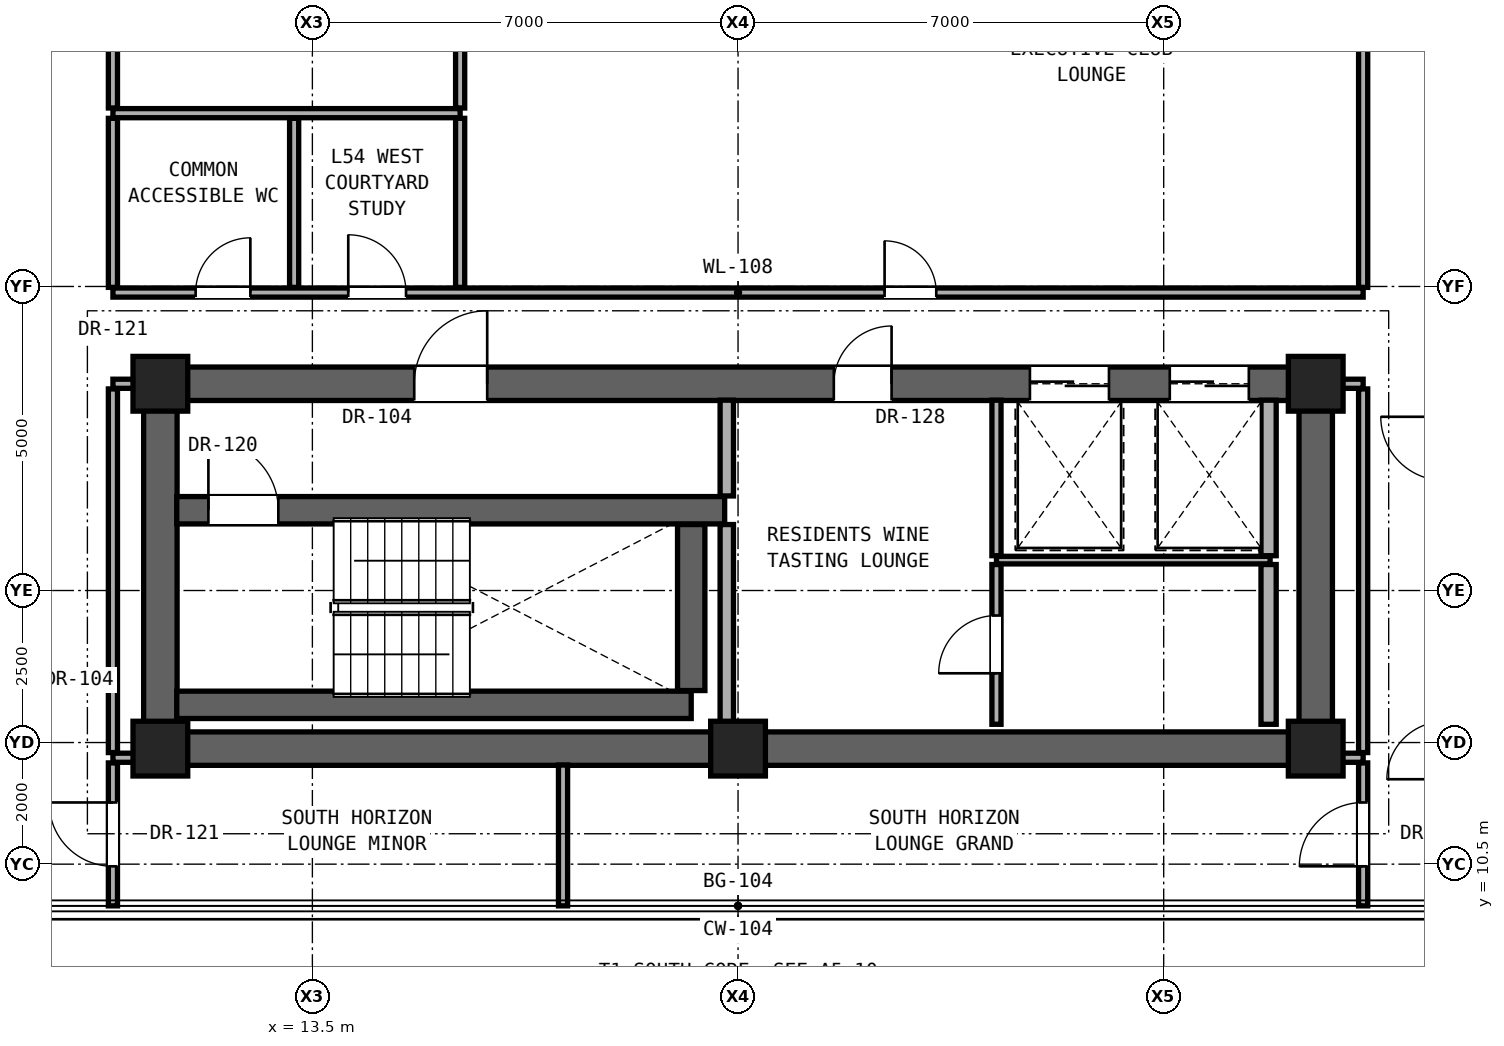
"""IFC4 building model, lengths in metres.
Left out: names, types, materials, properties, quantities, classifications, styles, units other than length and angle.
Written with IfcOpenShell. Run it as: python <this file> out.ifc"""

import sys

from ifc_helpers import new_model, si_unit, direction, frame, frame_2d, origin, origin_2d, place, context, subcontext, project, spatial, rectangle, extrude, element, fill, save


model = new_model("IFC4")
c1 = context("Model", 3, precision=1e-05, world=origin(), true_north=direction((0.0, 1.0)))
c2 = subcontext(c1, "Body", "Model", "MODEL_VIEW")
j1 = project(units=[si_unit("LENGTHUNIT", "METRE"), si_unit("PLANEANGLEUNIT", "RADIAN")], contexts=[c1])
p1 = place(None, origin())
s1 = spatial("IfcSite", under=j1, at=p1, CompositionType="ELEMENT")
p2 = place(p1, origin())
s2 = spatial("IfcBuilding", under=s1, at=p2, CompositionType="ELEMENT")
p3 = place(p2, frame((0.0, 0.0, 190.15)))
s3 = spatial("IfcBuildingStorey", under=s2, at=p3, CompositionType="ELEMENT", Elevation=190.15)
for number, where, z_axis, x_axis in (
    (1, (11.0, 12.4, 0.0), (0.0, 0.0, 1.0), (1.0, 0.0, 0.0)),
    (2, (20.5, 12.4, 0.0), (0.0, 0.0, 1.0), (1.0, 0.0, 0.0)),
    (3, (30.0, 12.4, 0.0), (0.0, 0.0, 1.0), (1.0, 0.0, 0.0)),
    (4, (11.0, 18.4, 0.0), (0.0, 0.0, 1.0), (1.0, 0.0, 0.0)),
    (5, (30.0, 18.4, 0.0), (0.0, 0.0, 1.0), (1.0, 0.0, 0.0)),
):
    element("IfcColumn", number, at=place(p3, frame(where, z_axis=z_axis, x_axis=x_axis)), inside=s3, PredefinedType="COLUMN", context=c2, shape_type="SweptSolid", body=[
        extrude(rectangle(XDim=0.9, YDim=0.9, at=origin_2d()), origin(), (0.0, 0.0, 1.0), 3.25),
    ])
p4 = place(p3, frame((11.0, 12.4, 0.0), z_axis=(0.0, 0.0, 1.0), x_axis=(1.0, 0.0, 0.0)))
e6 = element("IfcWall", 6, at=p4, inside=s3, PredefinedType="SHEAR", context=c2, shape_type="SweptSolid", body=[
    extrude(rectangle(XDim=19.0, YDim=0.55, at=frame_2d((9.5, 0.0))), origin(), (0.0, 0.0, 1.0), 3.05),
])
for number, where, z_axis, x_axis in (
    (7, (11.0, 12.4, 0.0), (0.0, 0.0, 1.0), (0.0, 1.0, 0.0)),
    (8, (30.0, 12.4, 0.0), (0.0, 0.0, 1.0), (0.0, 1.0, 0.0)),
):
    element("IfcWall", number, at=place(p3, frame(where, z_axis=z_axis, x_axis=x_axis)), inside=s3, PredefinedType="SHEAR", context=c2, shape_type="SweptSolid", body=[
        extrude(rectangle(XDim=6.0, YDim=0.55, at=frame_2d((3.0, 0.0))), origin(), (0.0, 0.0, 1.0), 3.05),
    ])
p5 = place(p3, frame((11.0, 18.4, 0.0), z_axis=(0.0, 0.0, 1.0), x_axis=(1.0, 0.0, 0.0)))
e9 = element("IfcWall", 9, at=p5, inside=s3, PredefinedType="SHEAR", context=c2, shape_type="SweptSolid", body=[
    extrude(rectangle(XDim=19.0, YDim=0.55, at=frame_2d((9.5, 0.0))), origin(), (0.0, 0.0, 1.0), 3.05),
])
p6 = place(p5, frame((4.175, 0.0, 0.0)))
e10 = element("IfcOpeningElement", 10, at=p6, cuts=e9, PredefinedType="OPENING", context=c2, shape_type="SweptSolid", body=[
    extrude(rectangle(XDim=1.2, YDim=2.25, at=frame_2d((0.6, 1.125))), frame((0.0, 0.285, 0.0), z_axis=(0.0, -1.0, 0.0), x_axis=(1.0, 0.0, 0.0)), (0.0, 0.0, 1.0), 0.57),
])
p7 = place(p5, frame((11.075, 0.0, 0.0)))
e11 = element("IfcOpeningElement", 11, at=p7, cuts=e9, PredefinedType="OPENING", context=c2, shape_type="SweptSolid", body=[
    extrude(rectangle(XDim=0.95, YDim=2.15, at=frame_2d((0.475, 1.075))), frame((0.0, 0.285, 0.0), z_axis=(0.0, -1.0, 0.0), x_axis=(1.0, 0.0, 0.0)), (0.0, 0.0, 1.0), 0.57),
])
p8 = place(p5, frame((14.3, 0.0, 0.0)))
e12 = element("IfcOpeningElement", 12, at=p8, cuts=e9, PredefinedType="OPENING", context=c2, shape_type="SweptSolid", body=[
    extrude(rectangle(XDim=1.3, YDim=2.3, at=frame_2d((0.65, 1.15))), frame((0.0, 0.285, 0.0), z_axis=(0.0, -1.0, 0.0), x_axis=(1.0, 0.0, 0.0)), (0.0, 0.0, 1.0), 0.57),
])
p9 = place(p5, frame((16.6, 0.0, 0.0)))
e13 = element("IfcOpeningElement", 13, at=p9, cuts=e9, PredefinedType="OPENING", context=c2, shape_type="SweptSolid", body=[
    extrude(rectangle(XDim=1.3, YDim=2.3, at=frame_2d((0.65, 1.15))), frame((0.0, 0.285, 0.0), z_axis=(0.0, -1.0, 0.0), x_axis=(1.0, 0.0, 0.0)), (0.0, 0.0, 1.0), 0.57),
])
for number, where, z_axis, x_axis in (
    (14, (10.22, 12.25, 0.0), (0.0, 0.0, 1.0), (1.0, 0.0, 0.0)),
    (15, (30.27, 12.25, 0.0), (0.0, 0.0, 1.0), (1.0, 0.0, 0.0)),
):
    element("IfcWall", number, at=place(p3, frame(where, z_axis=z_axis, x_axis=x_axis)), inside=s3, PredefinedType="PARTITIONING", context=c2, shape_type="SweptSolid", body=[
        extrude(rectangle(XDim=0.51, YDim=0.15, at=frame_2d((0.255, 0.0))), origin(), (0.0, 0.0, 1.0), 3.05),
    ])
p10 = place(p3, frame((11.27, 13.12, 0.0), z_axis=(0.0, 0.0, 1.0), x_axis=(1.0, 0.0, 0.0)))
e16 = element("IfcWall", 16, at=p10, inside=s3, PredefinedType="SHEAR", context=c2, shape_type="SweptSolid", body=[
    extrude(rectangle(XDim=8.46, YDim=0.45, at=frame_2d((4.23, 0.0))), origin(), (0.0, 0.0, 1.0), 3.05),
])
p11 = place(p3, frame((24.75, 15.5, 0.0), z_axis=(0.0, 0.0, 1.0), x_axis=(1.0, 0.0, 0.0)))
e17 = element("IfcWall", 17, at=p11, inside=s3, PredefinedType="PARTITIONING", context=c2, shape_type="SweptSolid", body=[
    extrude(rectangle(XDim=4.5, YDim=0.125, at=frame_2d((2.25, 0.0))), origin(), (0.0, 0.0, 1.0), 3.05),
])
p12 = place(p3, frame((11.27, 16.32, 0.0), z_axis=(0.0, 0.0, 1.0), x_axis=(1.0, 0.0, 0.0)))
e18 = element("IfcWall", 18, at=p12, inside=s3, PredefinedType="SHEAR", context=c2, shape_type="SweptSolid", body=[
    extrude(rectangle(XDim=9.01, YDim=0.45, at=frame_2d((4.505, 0.0))), origin(), (0.0, 0.0, 1.0), 3.05),
])
p13 = place(p12, frame((0.52, 0.0, 0.0)))
e19 = element("IfcOpeningElement", 19, at=p13, cuts=e18, PredefinedType="OPENING", context=c2, shape_type="SweptSolid", body=[
    extrude(rectangle(XDim=1.15, YDim=2.2, at=frame_2d((0.575, 1.1))), frame((0.0, 0.235, 0.0), z_axis=(0.0, -1.0, 0.0), x_axis=(1.0, 0.0, 0.0)), (0.0, 0.0, 1.0), 0.47),
])
for number, where, z_axis, x_axis in (
    (20, (10.22, 18.4, 0.0), (0.0, 0.0, 1.0), (1.0, 0.0, 0.0)),
    (21, (30.27, 18.4, 0.0), (0.0, 0.0, 1.0), (1.0, 0.0, 0.0)),
):
    element("IfcWall", number, at=place(p3, frame(where, z_axis=z_axis, x_axis=x_axis)), inside=s3, PredefinedType="PARTITIONING", context=c2, shape_type="SweptSolid", body=[
        extrude(rectangle(XDim=0.51, YDim=0.15, at=frame_2d((0.255, 0.0))), origin(), (0.0, 0.0, 1.0), 2.442),
    ])
p14 = place(p3, frame((10.22, 19.9, 0.0), z_axis=(0.0, 0.0, 1.0), x_axis=(1.0, 0.0, 0.0)))
e22 = element("IfcWall", 22, at=p14, inside=s3, PredefinedType="PARTITIONING", context=c2, shape_type="SweptSolid", body=[
    extrude(rectangle(XDim=20.56, YDim=0.15, at=frame_2d((10.28, 0.0))), origin(), (0.0, 0.0, 1.0), 2.186),
])
p15 = place(p14, frame((1.36, 0.0, 0.0)))
e23 = element("IfcOpeningElement", 23, at=p15, cuts=e22, PredefinedType="OPENING", context=c2, shape_type="SweptSolid", body=[
    extrude(rectangle(XDim=0.9, YDim=2.1, at=frame_2d((0.45, 1.05))), frame((0.0, 0.085, 0.0), z_axis=(0.0, -1.0, 0.0), x_axis=(1.0, 0.0, 0.0)), (0.0, 0.0, 1.0), 0.17),
])
p16 = place(p14, frame((3.87, 0.0, 0.0)))
e24 = element("IfcOpeningElement", 24, at=p16, cuts=e22, PredefinedType="OPENING", context=c2, shape_type="SweptSolid", body=[
    extrude(rectangle(XDim=0.95, YDim=2.15, at=frame_2d((0.475, 1.075))), frame((0.0, 0.085, 0.0), z_axis=(0.0, -1.0, 0.0), x_axis=(1.0, 0.0, 0.0)), (0.0, 0.0, 1.0), 0.17),
])
p17 = place(p14, frame((12.69, 0.0, 0.0)))
e25 = element("IfcOpeningElement", 25, at=p17, cuts=e22, PredefinedType="OPENING", context=c2, shape_type="SweptSolid", body=[
    extrude(rectangle(XDim=0.85, YDim=2.01, at=frame_2d((0.425, 1.005))), frame((0.0, 0.085, 0.0), z_axis=(0.0, -1.0, 0.0), x_axis=(1.0, 0.0, 0.0)), (0.0, 0.0, 1.0), 0.17),
])
p18 = place(p3, frame((10.22, 22.85, 0.0), z_axis=(0.0, 0.0, 1.0), x_axis=(1.0, 0.0, 0.0)))
e26 = element("IfcWall", 26, at=p18, inside=s3, PredefinedType="PARTITIONING", context=c2, shape_type="SweptSolid", body=[
    extrude(rectangle(XDim=5.71, YDim=0.15, at=frame_2d((2.855, 0.0))), origin(), (0.0, 0.0, 1.0), 2.186),
])
p19 = place(p3, frame((10.22, 9.814, 0.0), z_axis=(0.0, 0.0, 1.0), x_axis=(0.0, 1.0, 0.0)))
e27 = element("IfcWall", 27, at=p19, inside=s3, PredefinedType="PARTITIONING", context=c2, shape_type="SweptSolid", body=[
    extrude(rectangle(XDim=2.351, YDim=0.15, at=frame_2d((1.176, 0.0))), origin(), (0.0, 0.0, 1.0), 3.05),
])
p20 = place(p19, frame((0.65, 0.0, 0.0)))
e28 = element("IfcOpeningElement", 28, at=p20, cuts=e27, PredefinedType="OPENING", context=c2, shape_type="SweptSolid", body=[
    extrude(rectangle(XDim=1.05, YDim=2.2, at=frame_2d((0.525, 1.1))), frame((0.0, 0.085, 0.0), z_axis=(0.0, -1.0, 0.0), x_axis=(1.0, 0.0, 0.0)), (0.0, 0.0, 1.0), 0.17),
])
p21 = place(p3, frame((10.22, 12.335, 0.0), z_axis=(0.0, 0.0, 1.0), x_axis=(0.0, 1.0, 0.0)))
e29 = element("IfcWall", 29, at=p21, inside=s3, PredefinedType="PARTITIONING", context=c2, shape_type="SweptSolid", body=[
    extrude(rectangle(XDim=5.98, YDim=0.15, at=frame_2d((2.99, 0.0))), origin(), (0.0, 0.0, 1.0), 2.442),
])
p22 = place(p3, frame((10.22, 19.985, 0.0), z_axis=(0.0, 0.0, 1.0), x_axis=(0.0, 1.0, 0.0)))
e30 = element("IfcWall", 30, at=p22, inside=s3, PredefinedType="PARTITIONING", context=c2, shape_type="SweptSolid", body=[
    extrude(rectangle(XDim=2.78, YDim=0.15, at=frame_2d((1.39, 0.0))), origin(), (0.0, 0.0, 1.0), 3.05),
])
p23 = place(p3, frame((10.22, 22.935, 0.0), z_axis=(0.0, 0.0, 1.0), x_axis=(0.0, 1.0, 0.0)))
e31 = element("IfcWall", 31, at=p23, inside=s3, PredefinedType="PARTITIONING", context=c2, shape_type="SweptSolid", body=[
    extrude(rectangle(XDim=10.08, YDim=0.15, at=frame_2d((5.04, 0.0))), origin(), (0.0, 0.0, 1.0), 2.346),
])
p24 = place(p23, frame((4.565, 0.0, 0.0)))
e32 = element("IfcOpeningElement", 32, at=p24, cuts=e31, PredefinedType="OPENING", context=c2, shape_type="SweptSolid", body=[
    extrude(rectangle(XDim=0.95, YDim=2.15, at=frame_2d((0.475, 1.075))), frame((0.0, 0.085, 0.0), z_axis=(0.0, -1.0, 0.0), x_axis=(1.0, 0.0, 0.0)), (0.0, 0.0, 1.0), 0.17),
])
for number, where, z_axis, x_axis in (
    (33, (13.2, 19.985, 0.0), (0.0, 0.0, 1.0), (0.0, 1.0, 0.0)),
    (34, (15.93, 19.985, 0.0), (0.0, 0.0, 1.0), (0.0, 1.0, 0.0)),
):
    element("IfcWall", number, at=place(p3, frame(where, z_axis=z_axis, x_axis=x_axis)), inside=s3, PredefinedType="PARTITIONING", context=c2, shape_type="SweptSolid", body=[
        extrude(rectangle(XDim=2.78, YDim=0.15, at=frame_2d((1.39, 0.0))), origin(), (0.0, 0.0, 1.0), 3.05),
    ])
p25 = place(p3, frame((15.93, 22.935, 0.0), z_axis=(0.0, 0.0, 1.0), x_axis=(0.0, 1.0, 0.0)))
e35 = element("IfcWall", 35, at=p25, inside=s3, PredefinedType="PARTITIONING", context=c2, shape_type="SweptSolid", body=[
    extrude(rectangle(XDim=4.536, YDim=0.15, at=frame_2d((2.268, 0.0))), origin(), (0.0, 0.0, 1.0), 2.186),
])
p26 = place(p3, frame((17.622, 9.814, 0.0), z_axis=(0.0, 0.0, 1.0), x_axis=(0.0, 1.0, 0.0)))
e36 = element("IfcWall", 36, at=p26, inside=s3, PredefinedType="PARTITIONING", context=c2, shape_type="SweptSolid", body=[
    extrude(rectangle(XDim=2.316, YDim=0.15, at=frame_2d((1.158, 0.0))), origin(), (0.0, 0.0, 1.0), 3.05),
])
p27 = place(p3, frame((19.73, 13.355, 0.0), z_axis=(0.0, 0.0, 1.0), x_axis=(0.0, 1.0, 0.0)))
e37 = element("IfcWall", 37, at=p27, inside=s3, PredefinedType="SHEAR", context=c2, shape_type="SweptSolid", body=[
    extrude(rectangle(XDim=2.73, YDim=0.45, at=frame_2d((1.365, 0.0))), origin(), (0.0, 0.0, 1.0), 3.05),
])
p28 = place(p3, frame((20.315, 12.8, 0.0), z_axis=(0.0, 0.0, 1.0), x_axis=(0.0, 1.0, 0.0)))
e38 = element("IfcWall", 38, at=p28, inside=s3, PredefinedType="SOLIDWALL", context=c2, shape_type="SweptSolid", body=[
    extrude(rectangle(XDim=3.285, YDim=0.22, at=frame_2d((1.643, 0.0))), origin(), (0.0, 0.0, 1.0), 3.05),
])
p29 = place(p3, frame((20.315, 16.555, 0.0), z_axis=(0.0, 0.0, 1.0), x_axis=(0.0, 1.0, 0.0)))
e39 = element("IfcWall", 39, at=p29, inside=s3, PredefinedType="SOLIDWALL", context=c2, shape_type="SweptSolid", body=[
    extrude(rectangle(XDim=1.575, YDim=0.22, at=frame_2d((0.788, 0.0))), origin(), (0.0, 0.0, 1.0), 3.05),
])
p30 = place(p3, frame((24.75, 12.8, 0.0), z_axis=(0.0, 0.0, 1.0), x_axis=(0.0, 1.0, 0.0)))
e40 = element("IfcWall", 40, at=p30, inside=s3, PredefinedType="PARTITIONING", context=c2, shape_type="SweptSolid", body=[
    extrude(rectangle(XDim=2.627, YDim=0.15, at=frame_2d((1.314, 0.0))), origin(), (0.0, 0.0, 1.0), 3.05),
])
p31 = place(p30, frame((0.839, 0.0, 0.0)))
e41 = element("IfcOpeningElement", 41, at=p31, cuts=e40, PredefinedType="OPENING", context=c2, shape_type="SweptSolid", body=[
    extrude(rectangle(XDim=0.95, YDim=2.15, at=frame_2d((0.475, 1.075))), frame((0.0, 0.085, 0.0), z_axis=(0.0, -1.0, 0.0), x_axis=(1.0, 0.0, 0.0)), (0.0, 0.0, 1.0), 0.17),
])
p32 = place(p3, frame((24.75, 15.573, 0.0), z_axis=(0.0, 0.0, 1.0), x_axis=(0.0, 1.0, 0.0)))
e42 = element("IfcWall", 42, at=p32, inside=s3, PredefinedType="PARTITIONING", context=c2, shape_type="SweptSolid", body=[
    extrude(rectangle(XDim=2.557, YDim=0.15, at=frame_2d((1.279, 0.0))), origin(), (0.0, 0.0, 1.0), 3.05),
])
p33 = place(p3, frame((29.225, 12.8, 0.0), z_axis=(0.0, 0.0, 1.0), x_axis=(0.0, 1.0, 0.0)))
e43 = element("IfcWall", 43, at=p33, inside=s3, PredefinedType="SOLIDWALL", context=c2, shape_type="SweptSolid", body=[
    extrude(rectangle(XDim=2.627, YDim=0.25, at=frame_2d((1.314, 0.0))), origin(), (0.0, 0.0, 1.0), 3.05),
])
p34 = place(p3, frame((29.225, 15.573, 0.0), z_axis=(0.0, 0.0, 1.0), x_axis=(0.0, 1.0, 0.0)))
e44 = element("IfcWall", 44, at=p34, inside=s3, PredefinedType="SOLIDWALL", context=c2, shape_type="SweptSolid", body=[
    extrude(rectangle(XDim=2.557, YDim=0.25, at=frame_2d((1.279, 0.0))), origin(), (0.0, 0.0, 1.0), 3.05),
])
p35 = place(p3, frame((30.78, 9.814, 0.0), z_axis=(0.0, 0.0, 1.0), x_axis=(0.0, 1.0, 0.0)))
e45 = element("IfcWall", 45, at=p35, inside=s3, PredefinedType="PARTITIONING", context=c2, shape_type="SweptSolid", body=[
    extrude(rectangle(XDim=2.351, YDim=0.15, at=frame_2d((1.176, 0.0))), origin(), (0.0, 0.0, 1.0), 3.05),
])
p36 = place(p35, frame((0.65, 0.0, 0.0)))
e46 = element("IfcOpeningElement", 46, at=p36, cuts=e45, PredefinedType="OPENING", context=c2, shape_type="SweptSolid", body=[
    extrude(rectangle(XDim=1.05, YDim=2.2, at=frame_2d((0.525, 1.1))), frame((0.0, 0.085, 0.0), z_axis=(0.0, -1.0, 0.0), x_axis=(1.0, 0.0, 0.0)), (0.0, 0.0, 1.0), 0.17),
])
p37 = place(p3, frame((30.78, 12.335, 0.0), z_axis=(0.0, 0.0, 1.0), x_axis=(0.0, 1.0, 0.0)))
e47 = element("IfcWall", 47, at=p37, inside=s3, PredefinedType="PARTITIONING", context=c2, shape_type="SweptSolid", body=[
    extrude(rectangle(XDim=5.98, YDim=0.15, at=frame_2d((2.99, 0.0))), origin(), (0.0, 0.0, 1.0), 2.442),
])
p38 = place(p3, frame((30.78, 19.985, 0.0), z_axis=(0.0, 0.0, 1.0), x_axis=(0.0, 1.0, 0.0)))
e48 = element("IfcWall", 48, at=p38, inside=s3, PredefinedType="PARTITIONING", context=c2, shape_type="SweptSolid", body=[
    extrude(rectangle(XDim=7.486, YDim=0.15, at=frame_2d((3.743, 0.0))), origin(), (0.0, 0.0, 1.0), 2.346),
])
p39 = place(p6, origin())
e49 = element("IfcDoor", 49, at=p39, inside=s3, OperationType="SINGLE_SWING_RIGHT", PredefinedType="DOOR", context=c2, shape_type="SweptSolid", body=[
    extrude(rectangle(XDim=1.2, YDim=2.25, at=frame_2d((0.6, 1.125))), frame((0.0, 0.025, 0.0), z_axis=(0.0, -1.0, 0.0), x_axis=(1.0, 0.0, 0.0)), (0.0, 0.0, 1.0), 0.05),
])
fill(e10, e49)
p40 = place(p13, origin())
e50 = element("IfcDoor", 50, at=p40, inside=s3, OperationType="SINGLE_SWING_LEFT", PredefinedType="DOOR", context=c2, shape_type="SweptSolid", body=[
    extrude(rectangle(XDim=1.15, YDim=2.2, at=frame_2d((0.575, 1.1))), frame((0.0, 0.025, 0.0), z_axis=(0.0, -1.0, 0.0), x_axis=(1.0, 0.0, 0.0)), (0.0, 0.0, 1.0), 0.05),
])
fill(e19, e50)
p41 = place(p7, origin())
e51 = element("IfcDoor", 51, at=p41, inside=s3, OperationType="SINGLE_SWING_RIGHT", PredefinedType="DOOR", context=c2, shape_type="SweptSolid", body=[
    extrude(rectangle(XDim=0.95, YDim=2.15, at=frame_2d((0.475, 1.075))), frame((0.0, 0.025, 0.0), z_axis=(0.0, -1.0, 0.0), x_axis=(1.0, 0.0, 0.0)), (0.0, 0.0, 1.0), 0.05),
])
fill(e11, e51)
p42 = place(p31, origin())
e52 = element("IfcDoor", 52, at=p42, inside=s3, OperationType="SINGLE_SWING_LEFT", PredefinedType="DOOR", context=c2, shape_type="SweptSolid", body=[
    extrude(rectangle(XDim=0.95, YDim=2.15, at=frame_2d((0.475, 1.075))), frame((0.0, 0.025, 0.0), z_axis=(0.0, -1.0, 0.0), x_axis=(1.0, 0.0, 0.0)), (0.0, 0.0, 1.0), 0.05),
])
fill(e41, e52)
p43 = place(p15, origin())
e53 = element("IfcDoor", 53, at=p43, inside=s3, OperationType="SINGLE_SWING_RIGHT", PredefinedType="DOOR", context=c2, shape_type="SweptSolid", body=[
    extrude(rectangle(XDim=0.9, YDim=2.1, at=frame_2d((0.45, 1.05))), frame((0.0, 0.025, 0.0), z_axis=(0.0, -1.0, 0.0), x_axis=(1.0, 0.0, 0.0)), (0.0, 0.0, 1.0), 0.05),
])
fill(e23, e53)
p44 = place(p16, origin())
e54 = element("IfcDoor", 54, at=p44, inside=s3, OperationType="SINGLE_SWING_LEFT", PredefinedType="DOOR", context=c2, shape_type="SweptSolid", body=[
    extrude(rectangle(XDim=0.95, YDim=2.15, at=frame_2d((0.475, 1.075))), frame((0.0, 0.025, 0.0), z_axis=(0.0, -1.0, 0.0), x_axis=(1.0, 0.0, 0.0)), (0.0, 0.0, 1.0), 0.05),
])
fill(e24, e54)
p45 = place(p17, origin())
e55 = element("IfcDoor", 55, at=p45, inside=s3, OperationType="SINGLE_SWING_LEFT", PredefinedType="DOOR", context=c2, shape_type="SweptSolid", body=[
    extrude(rectangle(XDim=0.85, YDim=2.01, at=frame_2d((0.425, 1.005))), frame((0.0, 0.025, 0.0), z_axis=(0.0, -1.0, 0.0), x_axis=(1.0, 0.0, 0.0)), (0.0, 0.0, 1.0), 0.05),
])
fill(e25, e55)
p46 = place(p20, origin())
e56 = element("IfcDoor", 56, at=p46, inside=s3, OperationType="SINGLE_SWING_RIGHT", PredefinedType="DOOR", context=c2, shape_type="SweptSolid", body=[
    extrude(rectangle(XDim=1.05, YDim=2.2, at=frame_2d((0.525, 1.1))), frame((0.0, 0.025, 0.0), z_axis=(0.0, -1.0, 0.0), x_axis=(1.0, 0.0, 0.0)), (0.0, 0.0, 1.0), 0.05),
])
fill(e28, e56)
p47 = place(p36, origin())
e57 = element("IfcDoor", 57, at=p47, inside=s3, OperationType="SINGLE_SWING_LEFT", PredefinedType="DOOR", context=c2, shape_type="SweptSolid", body=[
    extrude(rectangle(XDim=1.05, YDim=2.2, at=frame_2d((0.525, 1.1))), frame((0.0, 0.025, 0.0), z_axis=(0.0, -1.0, 0.0), x_axis=(1.0, 0.0, 0.0)), (0.0, 0.0, 1.0), 0.05),
])
fill(e46, e57)
p48 = place(p8, origin())
e58 = element("IfcDoor", 58, at=p48, inside=s3, OperationType="DOUBLE_DOOR_SLIDING", PredefinedType="DOOR", context=c2, shape_type="SweptSolid", body=[
    extrude(rectangle(XDim=1.3, YDim=2.3, at=frame_2d((0.65, 1.15))), frame((0.0, 0.025, 0.0), z_axis=(0.0, -1.0, 0.0), x_axis=(1.0, 0.0, 0.0)), (0.0, 0.0, 1.0), 0.05),
])
fill(e12, e58)
p49 = place(p9, origin())
e59 = element("IfcDoor", 59, at=p49, inside=s3, OperationType="DOUBLE_DOOR_SLIDING", PredefinedType="DOOR", context=c2, shape_type="SweptSolid", body=[
    extrude(rectangle(XDim=1.3, YDim=2.3, at=frame_2d((0.65, 1.15))), frame((0.0, 0.025, 0.0), z_axis=(0.0, -1.0, 0.0), x_axis=(1.0, 0.0, 0.0)), (0.0, 0.0, 1.0), 0.05),
])
fill(e13, e59)
save(model, sys.argv[1])
